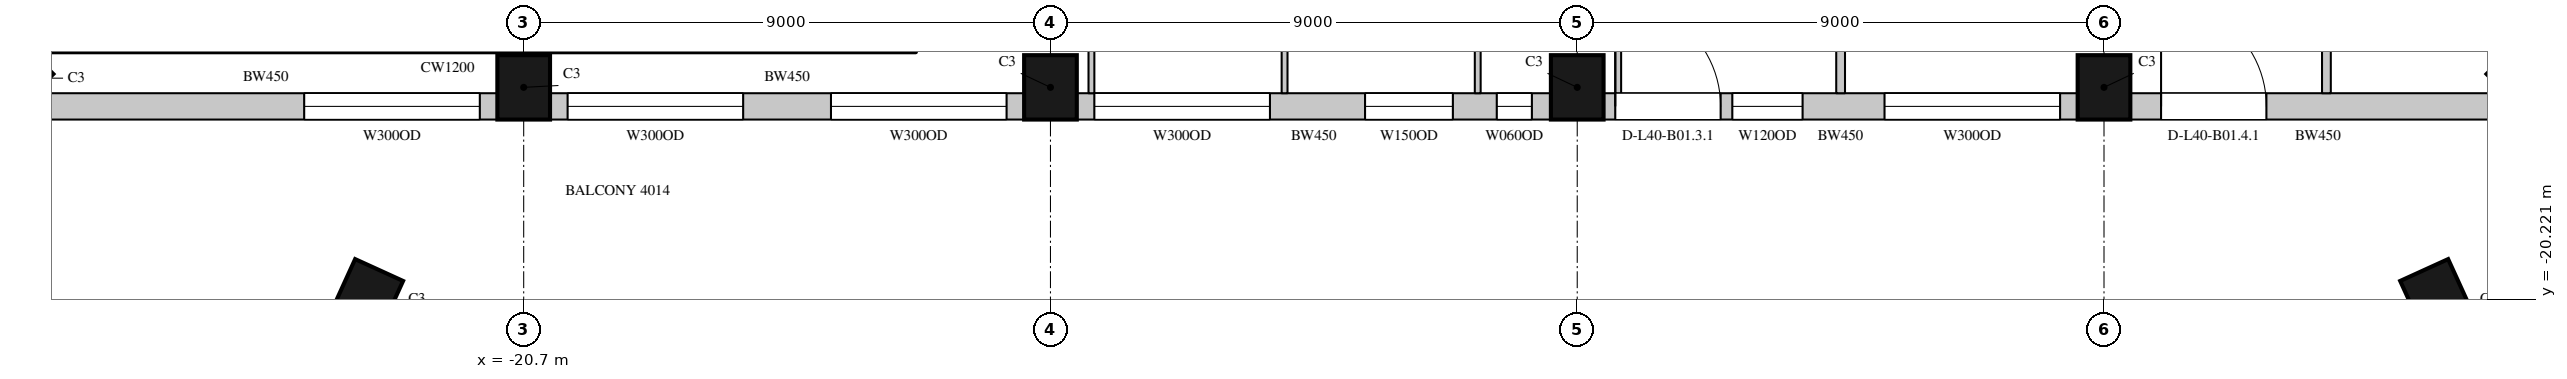
"""IFC4 building model, lengths in metres.
Left out: names, types, materials, properties, quantities, classifications, styles, units other than length and angle.
Written with IfcOpenShell. Run it as: python <this file> out.ifc"""

import sys

from ifc_helpers import new_model, si_unit, direction, frame, frame_2d, origin, origin_2d, place, context, subcontext, project, spatial, rectangle, extrude, element, fill, save


model = new_model("IFC4")
c1 = context("Model", 3, precision=1e-05, world=origin(), true_north=direction((0.0, 1.0)))
c2 = subcontext(c1, "Body", "Model", "MODEL_VIEW")
j1 = project(units=[si_unit("LENGTHUNIT", "METRE"), si_unit("PLANEANGLEUNIT", "RADIAN")], contexts=[c1])
p1 = place(None, origin())
s1 = spatial("IfcSite", under=j1, at=p1, CompositionType="ELEMENT")
p2 = place(p1, origin())
s2 = spatial("IfcBuilding", under=s1, at=p2, CompositionType="ELEMENT")
p3 = place(p2, frame((0.0, 0.0, 185.1)))
s3 = spatial("IfcBuildingStorey", under=s2, at=p3, CompositionType="ELEMENT", Elevation=185.1)
for number, where, z_axis, x_axis in (
    (1, (-29.443, -16.443, 0.0), (0.0, 0.0, 1.0), (0.707, -0.707, 0.0)),
    (2, (-20.7, -16.6, 0.0), (0.0, 0.0, 1.0), (1.0, 0.0, 0.0)),
    (3, (-11.7, -16.6, 0.0), (0.0, 0.0, 1.0), (1.0, 0.0, 0.0)),
    (4, (-2.7, -16.6, 0.0), (0.0, 0.0, 1.0), (1.0, 0.0, 0.0)),
    (5, (6.3, -16.6, 0.0), (0.0, 0.0, 1.0), (1.0, 0.0, 0.0)),
    (6, (13.543, -16.443, 0.0), (0.0, 0.0, 1.0), (0.707, 0.707, 0.0)),
    (7, (-23.398, -20.221, 0.0), (0.0, 0.0, 1.0), (0.91, -0.415, 0.0)),
    (8, (11.998, -20.221, 0.0), (0.0, 0.0, 1.0), (0.91, 0.415, 0.0)),
):
    element("IfcColumn", number, at=place(p3, frame(where, z_axis=z_axis, x_axis=x_axis)), inside=s3, PredefinedType="COLUMN", context=c2, shape_type="SweptSolid", body=[
        extrude(rectangle(XDim=0.9, YDim=1.1, at=origin_2d()), origin(), (0.0, 0.0, 1.0), 4.1),
    ])
p4 = place(p3, frame((-29.064, -16.925, 0.0), z_axis=(0.0, 0.0, 1.0), x_axis=(1.0, 0.0, 0.0)))
e9 = element("IfcWall", 9, at=p4, inside=s3, PredefinedType="SOLIDWALL", context=c2, shape_type="SweptSolid", body=[
    extrude(rectangle(XDim=7.914, YDim=0.45, at=frame_2d((3.957, 0.0))), origin(), (0.0, 0.0, 1.0), 3.8),
])
p5 = place(p4, frame((4.614, 0.0, 1.05)))
e10 = element("IfcOpeningElement", 10, at=p5, cuts=e9, PredefinedType="OPENING", context=c2, shape_type="SweptSolid", body=[
    extrude(rectangle(XDim=3.0, YDim=2.4, at=frame_2d((1.5, 1.2))), frame((0.0, 0.235, 0.0), z_axis=(0.0, -1.0, 0.0), x_axis=(1.0, 0.0, 0.0)), (0.0, 0.0, 1.0), 0.47),
])
p6 = place(p3, frame((-20.25, -16.925, 0.0), z_axis=(0.0, 0.0, 1.0), x_axis=(1.0, 0.0, 0.0)))
e11 = element("IfcWall", 11, at=p6, inside=s3, PredefinedType="SOLIDWALL", context=c2, shape_type="SweptSolid", body=[
    extrude(rectangle(XDim=8.1, YDim=0.45, at=frame_2d((4.05, 0.0))), origin(), (0.0, 0.0, 1.0), 3.8),
])
p7 = place(p6, frame((0.3, 0.0, 1.05)))
e12 = element("IfcOpeningElement", 12, at=p7, cuts=e11, PredefinedType="OPENING", context=c2, shape_type="SweptSolid", body=[
    extrude(rectangle(XDim=3.0, YDim=2.4, at=frame_2d((1.5, 1.2))), frame((0.0, 0.235, 0.0), z_axis=(0.0, -1.0, 0.0), x_axis=(1.0, 0.0, 0.0)), (0.0, 0.0, 1.0), 0.47),
])
p8 = place(p6, frame((4.8, 0.0, 1.05)))
e13 = element("IfcOpeningElement", 13, at=p8, cuts=e11, PredefinedType="OPENING", context=c2, shape_type="SweptSolid", body=[
    extrude(rectangle(XDim=3.0, YDim=2.4, at=frame_2d((1.5, 1.2))), frame((0.0, 0.235, 0.0), z_axis=(0.0, -1.0, 0.0), x_axis=(1.0, 0.0, 0.0)), (0.0, 0.0, 1.0), 0.47),
])
p9 = place(p3, frame((-11.25, -16.925, 0.0), z_axis=(0.0, 0.0, 1.0), x_axis=(1.0, 0.0, 0.0)))
e14 = element("IfcWall", 14, at=p9, inside=s3, PredefinedType="SOLIDWALL", context=c2, shape_type="SweptSolid", body=[
    extrude(rectangle(XDim=8.1, YDim=0.45, at=frame_2d((4.05, 0.0))), origin(), (0.0, 0.0, 1.0), 3.8),
])
p10 = place(p9, frame((0.3, 0.0, 1.05)))
e15 = element("IfcOpeningElement", 15, at=p10, cuts=e14, PredefinedType="OPENING", context=c2, shape_type="SweptSolid", body=[
    extrude(rectangle(XDim=3.0, YDim=2.4, at=frame_2d((1.5, 1.2))), frame((0.0, 0.235, 0.0), z_axis=(0.0, -1.0, 0.0), x_axis=(1.0, 0.0, 0.0)), (0.0, 0.0, 1.0), 0.47),
])
p11 = place(p9, frame((4.925, 0.0, 1.05)))
e16 = element("IfcOpeningElement", 16, at=p11, cuts=e14, PredefinedType="OPENING", context=c2, shape_type="SweptSolid", body=[
    extrude(rectangle(XDim=1.5, YDim=2.4, at=frame_2d((0.75, 1.2))), frame((0.0, 0.235, 0.0), z_axis=(0.0, -1.0, 0.0), x_axis=(1.0, 0.0, 0.0)), (0.0, 0.0, 1.0), 0.47),
])
p12 = place(p9, frame((7.175, 0.0, 1.05)))
e17 = element("IfcOpeningElement", 17, at=p12, cuts=e14, PredefinedType="OPENING", context=c2, shape_type="SweptSolid", body=[
    extrude(rectangle(XDim=0.6, YDim=2.4, at=frame_2d((0.3, 1.2))), frame((0.0, 0.235, 0.0), z_axis=(0.0, -1.0, 0.0), x_axis=(1.0, 0.0, 0.0)), (0.0, 0.0, 1.0), 0.47),
])
p13 = place(p3, frame((-2.25, -16.925, 0.0), z_axis=(0.0, 0.0, 1.0), x_axis=(1.0, 0.0, 0.0)))
e18 = element("IfcWall", 18, at=p13, inside=s3, PredefinedType="SOLIDWALL", context=c2, shape_type="SweptSolid", body=[
    extrude(rectangle(XDim=8.1, YDim=0.45, at=frame_2d((4.05, 0.0))), origin(), (0.0, 0.0, 1.0), 3.8),
])
p14 = place(p13, frame((0.2, 0.0, 0.0)))
e19 = element("IfcOpeningElement", 19, at=p14, cuts=e18, PredefinedType="OPENING", context=c2, shape_type="SweptSolid", body=[
    extrude(rectangle(XDim=1.8, YDim=2.4, at=frame_2d((0.9, 1.2))), frame((0.0, 0.235, 0.0), z_axis=(0.0, -1.0, 0.0), x_axis=(1.0, 0.0, 0.0)), (0.0, 0.0, 1.0), 0.47),
])
p15 = place(p13, frame((2.2, 0.0, 1.05)))
e20 = element("IfcOpeningElement", 20, at=p15, cuts=e18, PredefinedType="OPENING", context=c2, shape_type="SweptSolid", body=[
    extrude(rectangle(XDim=1.2, YDim=2.4, at=frame_2d((0.6, 1.2))), frame((0.0, 0.235, 0.0), z_axis=(0.0, -1.0, 0.0), x_axis=(1.0, 0.0, 0.0)), (0.0, 0.0, 1.0), 0.47),
])
p16 = place(p13, frame((4.8, 0.0, 1.05)))
e21 = element("IfcOpeningElement", 21, at=p16, cuts=e18, PredefinedType="OPENING", context=c2, shape_type="SweptSolid", body=[
    extrude(rectangle(XDim=3.0, YDim=2.4, at=frame_2d((1.5, 1.2))), frame((0.0, 0.235, 0.0), z_axis=(0.0, -1.0, 0.0), x_axis=(1.0, 0.0, 0.0)), (0.0, 0.0, 1.0), 0.47),
])
p17 = place(p3, frame((6.75, -16.925, 0.0), z_axis=(0.0, 0.0, 1.0), x_axis=(1.0, 0.0, 0.0)))
e22 = element("IfcWall", 22, at=p17, inside=s3, PredefinedType="SOLIDWALL", context=c2, shape_type="SweptSolid", body=[
    extrude(rectangle(XDim=6.414, YDim=0.45, at=frame_2d((3.207, 0.0))), origin(), (0.0, 0.0, 1.0), 3.8),
])
p18 = place(p17, frame((0.525, 0.0, 0.0)))
e23 = element("IfcOpeningElement", 23, at=p18, cuts=e22, PredefinedType="OPENING", context=c2, shape_type="SweptSolid", body=[
    extrude(rectangle(XDim=1.8, YDim=2.4, at=frame_2d((0.9, 1.2))), frame((0.0, 0.235, 0.0), z_axis=(0.0, -1.0, 0.0), x_axis=(1.0, 0.0, 0.0)), (0.0, 0.0, 1.0), 0.47),
])
p19 = place(p3, frame((-19.63, -18.0, 0.0), z_axis=(0.0, 0.0, 1.0), x_axis=(1.0, 0.0, 0.0)))
e24 = element("IfcWall", 24, at=p19, inside=s3, PredefinedType="SOLIDWALL", context=c2, shape_type="SweptSolid", body=[
    extrude(rectangle(XDim=3.56, YDim=0.45, at=frame_2d((1.78, 0.0))), origin(), (0.0, 0.0, 1.0), 0.6),
])
p20 = place(p3, frame((-3.89, -18.0, 0.0), z_axis=(0.0, 0.0, 1.0), x_axis=(1.0, 0.0, 0.0)))
e25 = element("IfcWall", 25, at=p20, inside=s3, PredefinedType="SOLIDWALL", context=c2, shape_type="SweptSolid", body=[
    extrude(rectangle(XDim=1.54, YDim=0.45, at=frame_2d((0.77, 0.0))), origin(), (0.0, 0.0, 1.0), 0.6),
])
p21 = place(p3, frame((1.8, -16.7, 0.0), z_axis=(0.0, 0.0, 1.0), x_axis=(0.0, 1.0, 0.0)))
e26 = element("IfcWall", 26, at=p21, inside=s3, PredefinedType="PARTITIONING", context=c2, shape_type="SweptSolid", body=[
    extrude(rectangle(XDim=5.5, YDim=0.15, at=frame_2d((2.75, 0.0))), origin(), (0.0, 0.0, 1.0), 3.15),
])
p22 = place(p3, frame((10.1, -16.7, 0.0), z_axis=(0.0, 0.0, 1.0), x_axis=(0.0, 1.0, 0.0)))
e27 = element("IfcWall", 27, at=p22, inside=s3, PredefinedType="PARTITIONING", context=c2, shape_type="SweptSolid", body=[
    extrude(rectangle(XDim=5.6, YDim=0.15, at=frame_2d((2.8, 0.0))), origin(), (0.0, 0.0, 1.0), 3.8),
])
p23 = place(p3, frame((-11.0, -16.7, 0.0), z_axis=(0.0, 0.0, 1.0), x_axis=(0.0, 1.0, 0.0)))
e28 = element("IfcWall", 28, at=p23, inside=s3, PredefinedType="PARTITIONING", context=c2, shape_type="SweptSolid", body=[
    extrude(rectangle(XDim=1.88, YDim=0.1, at=frame_2d((0.94, 0.0))), origin(), (0.0, 0.0, 1.0), 3.8),
])
for number, where, z_axis, x_axis in (
    (29, (-7.7, -16.7, 0.0), (0.0, 0.0, 1.0), (0.0, 1.0, 0.0)),
    (30, (-4.4, -16.7, 0.0), (0.0, 0.0, 1.0), (0.0, 1.0, 0.0)),
    (31, (-2.0, -16.7, 0.0), (0.0, 0.0, 1.0), (0.0, 1.0, 0.0)),
):
    element("IfcWall", number, at=place(p3, frame(where, z_axis=z_axis, x_axis=x_axis)), inside=s3, PredefinedType="PARTITIONING", context=c2, shape_type="SweptSolid", body=[
        extrude(rectangle(XDim=5.5, YDim=0.1, at=frame_2d((2.75, 0.0))), origin(), (0.0, 0.0, 1.0), 3.8),
    ])
p24 = place(p5, origin())
e32 = element("IfcWindow", 32, at=p24, inside=s3, PartitioningType="SINGLE_PANEL", PredefinedType="WINDOW", context=c2, shape_type="SweptSolid", body=[
    extrude(rectangle(XDim=3.0, YDim=2.4, at=frame_2d((1.5, 1.2))), frame((0.0, 0.135, 0.0), z_axis=(0.0, -1.0, 0.0), x_axis=(1.0, 0.0, 0.0)), (0.0, 0.0, 1.0), 0.06),
])
fill(e10, e32)
p25 = place(p7, origin())
e33 = element("IfcWindow", 33, at=p25, inside=s3, PartitioningType="SINGLE_PANEL", PredefinedType="WINDOW", context=c2, shape_type="SweptSolid", body=[
    extrude(rectangle(XDim=3.0, YDim=2.4, at=frame_2d((1.5, 1.2))), frame((0.0, 0.135, 0.0), z_axis=(0.0, -1.0, 0.0), x_axis=(1.0, 0.0, 0.0)), (0.0, 0.0, 1.0), 0.06),
])
fill(e12, e33)
p26 = place(p8, origin())
e34 = element("IfcWindow", 34, at=p26, inside=s3, PartitioningType="SINGLE_PANEL", PredefinedType="WINDOW", context=c2, shape_type="SweptSolid", body=[
    extrude(rectangle(XDim=3.0, YDim=2.4, at=frame_2d((1.5, 1.2))), frame((0.0, 0.135, 0.0), z_axis=(0.0, -1.0, 0.0), x_axis=(1.0, 0.0, 0.0)), (0.0, 0.0, 1.0), 0.06),
])
fill(e13, e34)
p27 = place(p10, origin())
e35 = element("IfcWindow", 35, at=p27, inside=s3, PartitioningType="SINGLE_PANEL", PredefinedType="WINDOW", context=c2, shape_type="SweptSolid", body=[
    extrude(rectangle(XDim=3.0, YDim=2.4, at=frame_2d((1.5, 1.2))), frame((0.0, 0.135, 0.0), z_axis=(0.0, -1.0, 0.0), x_axis=(1.0, 0.0, 0.0)), (0.0, 0.0, 1.0), 0.06),
])
fill(e15, e35)
p28 = place(p14, origin())
e36 = element("IfcDoor", 36, at=p28, inside=s3, OperationType="SLIDING_TO_LEFT", PredefinedType="DOOR", context=c2, shape_type="SweptSolid", body=[
    extrude(rectangle(XDim=1.8, YDim=2.4, at=frame_2d((0.9, 1.2))), frame((0.0, 0.13, 0.0), z_axis=(0.0, -1.0, 0.0), x_axis=(1.0, 0.0, 0.0)), (0.0, 0.0, 1.0), 0.05),
])
fill(e19, e36)
p29 = place(p15, origin())
e37 = element("IfcWindow", 37, at=p29, inside=s3, PartitioningType="SINGLE_PANEL", PredefinedType="WINDOW", context=c2, shape_type="SweptSolid", body=[
    extrude(rectangle(XDim=1.2, YDim=2.4, at=frame_2d((0.6, 1.2))), frame((0.0, 0.135, 0.0), z_axis=(0.0, -1.0, 0.0), x_axis=(1.0, 0.0, 0.0)), (0.0, 0.0, 1.0), 0.06),
])
fill(e20, e37)
p30 = place(p16, origin())
e38 = element("IfcWindow", 38, at=p30, inside=s3, PartitioningType="SINGLE_PANEL", PredefinedType="WINDOW", context=c2, shape_type="SweptSolid", body=[
    extrude(rectangle(XDim=3.0, YDim=2.4, at=frame_2d((1.5, 1.2))), frame((0.0, 0.135, 0.0), z_axis=(0.0, -1.0, 0.0), x_axis=(1.0, 0.0, 0.0)), (0.0, 0.0, 1.0), 0.06),
])
fill(e21, e38)
p31 = place(p18, origin())
e39 = element("IfcDoor", 39, at=p31, inside=s3, OperationType="SLIDING_TO_LEFT", PredefinedType="DOOR", context=c2, shape_type="SweptSolid", body=[
    extrude(rectangle(XDim=1.8, YDim=2.4, at=frame_2d((0.9, 1.2))), frame((0.0, 0.13, 0.0), z_axis=(0.0, -1.0, 0.0), x_axis=(1.0, 0.0, 0.0)), (0.0, 0.0, 1.0), 0.05),
])
fill(e23, e39)
p32 = place(p11, origin())
e40 = element("IfcWindow", 40, at=p32, inside=s3, PartitioningType="SINGLE_PANEL", PredefinedType="WINDOW", context=c2, shape_type="SweptSolid", body=[
    extrude(rectangle(XDim=1.5, YDim=2.4, at=frame_2d((0.75, 1.2))), frame((0.0, 0.135, 0.0), z_axis=(0.0, -1.0, 0.0), x_axis=(1.0, 0.0, 0.0)), (0.0, 0.0, 1.0), 0.06),
])
fill(e16, e40)
p33 = place(p12, origin())
e41 = element("IfcWindow", 41, at=p33, inside=s3, PartitioningType="SINGLE_PANEL", PredefinedType="WINDOW", context=c2, shape_type="SweptSolid", body=[
    extrude(rectangle(XDim=0.6, YDim=2.4, at=frame_2d((0.3, 1.2))), frame((0.0, 0.135, 0.0), z_axis=(0.0, -1.0, 0.0), x_axis=(1.0, 0.0, 0.0)), (0.0, 0.0, 1.0), 0.06),
])
fill(e17, e41)
save(model, sys.argv[1])
